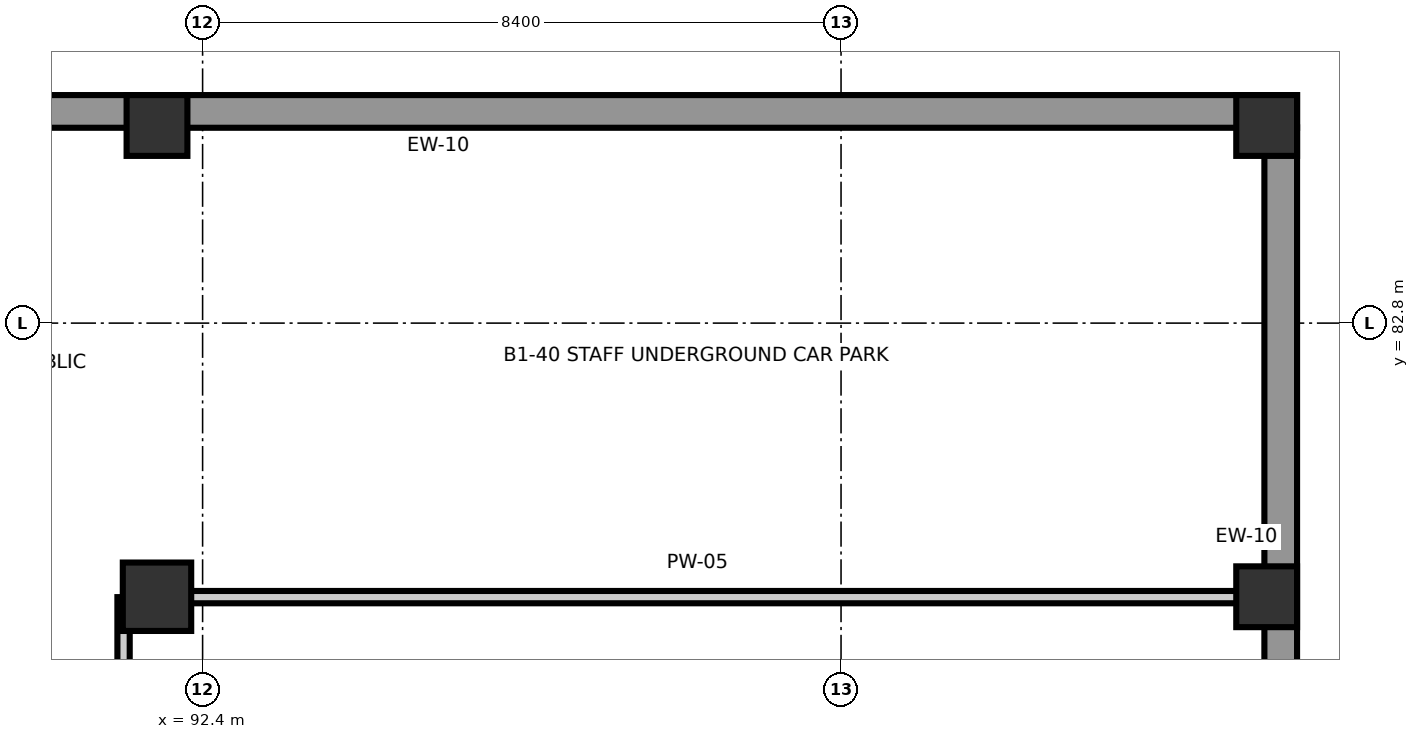
"""IFC4 building model, lengths in metres.
Left out: names, types, materials, properties, quantities, classifications, styles, units other than length and angle.
Written with IfcOpenShell. Run it as: python <this file> out.ifc"""

import sys

from ifc_helpers import new_model, si_unit, direction, frame, frame_2d, origin, origin_2d, place, context, subcontext, project, spatial, rectangle, extrude, element, save


model = new_model("IFC4")
c1 = context("Model", 3, precision=1e-05, world=origin(), true_north=direction((0.0, 1.0)))
c2 = subcontext(c1, "Body", "Model", "MODEL_VIEW")
j1 = project(units=[si_unit("LENGTHUNIT", "METRE"), si_unit("PLANEANGLEUNIT", "RADIAN")], contexts=[c1])
p1 = place(None, origin())
s1 = spatial("IfcSite", under=j1, at=p1, CompositionType="ELEMENT")
p2 = place(p1, origin())
s2 = spatial("IfcBuilding", under=s1, at=p2, CompositionType="ELEMENT")
p3 = place(p2, frame((0.0, 0.0, -4.2)))
s3 = spatial("IfcBuildingStorey", under=s2, at=p3, CompositionType="ELEMENT", Elevation=-4.2)
p4 = place(p3, frame((91.8, 79.2, 0.0), z_axis=(0.0, 0.0, 1.0), x_axis=(1.0, 0.0, 0.0)))
e1 = element("IfcColumn", 1, at=p4, inside=s3, PredefinedType="COLUMN", context=c2, shape_type="SweptSolid", body=[
    extrude(rectangle(XDim=0.9, YDim=0.9, at=origin_2d()), origin(), (0.0, 0.0, 1.0), 4.2),
])
for number, where, z_axis, x_axis in (
    (2, (91.8, 85.4, 0.0), (0.0, 0.0, 1.0), (1.0, 0.0, 0.0)),
    (3, (106.4, 79.2, 0.0), (0.0, 0.0, 1.0), (1.0, 0.0, 0.0)),
    (4, (106.4, 85.4, 0.0), (0.0, 0.0, 1.0), (1.0, 0.0, 0.0)),
):
    element("IfcColumn", number, at=place(p3, frame(where, z_axis=z_axis, x_axis=x_axis)), inside=s3, PredefinedType="COLUMN", context=c2, shape_type="SweptSolid", body=[
        extrude(rectangle(XDim=0.8, YDim=0.8, at=origin_2d()), origin(), (0.0, 0.0, 1.0), 4.2),
    ])
p5 = place(p3, frame((106.585, 41.445, 0.0), z_axis=(0.0, 0.0, 1.0), x_axis=(0.0, 1.0, 0.0)))
e5 = element("IfcWall", 5, at=p5, inside=s3, PredefinedType="SOLIDWALL", context=c2, shape_type="SweptSolid", body=[
    extrude(rectangle(XDim=43.93, YDim=0.43, at=frame_2d((21.965, 0.0))), origin(), (0.0, 0.0, 1.0), 4.2),
])
p6 = place(p3, frame((106.8, 85.585, 0.0), z_axis=(0.0, 0.0, 1.0), x_axis=(-1.0, 0.0, 0.0)))
e6 = element("IfcWall", 6, at=p6, inside=s3, PredefinedType="SOLIDWALL", context=c2, shape_type="SweptSolid", body=[
    extrude(rectangle(XDim=22.6, YDim=0.43, at=frame_2d((11.3, 0.0))), origin(), (0.0, 0.0, 1.0), 4.2),
])
p7 = place(p3, frame((91.36, 73.64, 0.0), z_axis=(0.0, 0.0, 1.0), x_axis=(0.0, 1.0, 0.0)))
e7 = element("IfcWall", 7, at=p7, inside=s3, PredefinedType="PARTITIONING", context=c2, shape_type="SweptSolid", body=[
    extrude(rectangle(XDim=5.555, YDim=0.162, at=frame_2d((2.778, 0.0))), origin(), (0.0, 0.0, 1.0), 3.09),
])
p8 = place(p7, frame((2.308, 0.0, 0.0)))
e8 = element("IfcOpeningElement", 8, at=p8, cuts=e7, PredefinedType="OPENING", context=c2, shape_type="SweptSolid", body=[
    extrude(rectangle(XDim=0.94, YDim=2.07, at=frame_2d((0.47, 1.035))), frame((0.0, 0.096, 0.0), z_axis=(0.0, -1.0, 0.0), x_axis=(1.0, 0.0, 0.0)), (0.0, 0.0, 1.0), 0.192),
])
p9 = place(p3, frame((91.461, 79.195, 0.0), z_axis=(0.0, 0.0, 1.0), x_axis=(1.0, 0.0, 0.0)))
e9 = element("IfcWall", 9, at=p9, inside=s3, PredefinedType="PARTITIONING", context=c2, shape_type="SweptSolid", body=[
    extrude(rectangle(XDim=14.899, YDim=0.162, at=frame_2d((7.45, 0.0))), origin(), (0.0, 0.0, 1.0), 2.89),
])
save(model, sys.argv[1])
